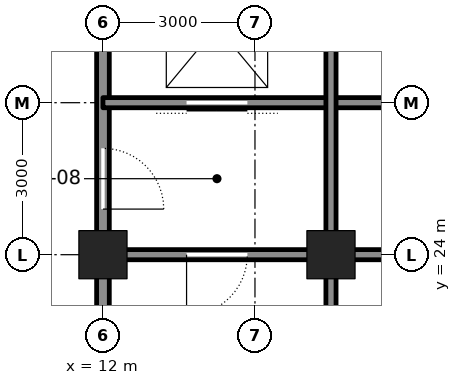
"""IFC4 building model, lengths in metres.
Left out: names, types, materials, properties, quantities, classifications, styles, units other than length and angle.
Written with IfcOpenShell. Run it as: python <this file> out.ifc"""

import sys

from ifc_helpers import new_model, si_unit, direction, frame, frame_2d, origin, origin_2d, place, context, subcontext, project, spatial, rectangle, hollow_rectangle, extrude, element, fill, save


model = new_model("IFC4")
c1 = context("Model", 3, precision=1e-05, world=origin(), true_north=direction((0.0, 1.0)))
c2 = subcontext(c1, "Body", "Model", "MODEL_VIEW")
j1 = project(units=[si_unit("LENGTHUNIT", "METRE"), si_unit("PLANEANGLEUNIT", "RADIAN")], contexts=[c1])
p1 = place(None, origin())
s1 = spatial("IfcSite", under=j1, at=p1, CompositionType="ELEMENT")
p2 = place(p1, origin())
s2 = spatial("IfcBuilding", under=s1, at=p2, CompositionType="ELEMENT")
p3 = place(p2, frame((0.0, 0.0, -5.0)))
s3 = spatial("IfcBuildingStorey", under=s2, at=p3, CompositionType="ELEMENT", Elevation=-5.0)
for number, where, z_axis, x_axis in (
    (1, (12.0, 24.0, -0.3), (0.0, 0.0, 1.0), (1.0, 0.0, 0.0)),
    (2, (16.5, 24.0, -0.3), (0.0, 0.0, 1.0), (1.0, 0.0, 0.0)),
):
    element("IfcColumn", number, at=place(p3, frame(where, z_axis=z_axis, x_axis=x_axis)), inside=s3, PredefinedType="COLUMN", context=c2, shape_type="SweptSolid", body=[
        extrude(hollow_rectangle(XDim=0.95, YDim=0.95, WallThickness=0.095, at=origin_2d()), origin(), (0.0, 0.0, 1.0), 5.3),
    ])
p4 = place(p3, frame((12.0, 21.25, 0.0), z_axis=(0.0, 0.0, 1.0), x_axis=(0.0, 1.0, 0.0)))
e3 = element("IfcWall", 3, at=p4, inside=s3, PredefinedType="SOLIDWALL", context=c2, shape_type="SweptSolid", body=[
    extrude(rectangle(XDim=2.5, YDim=0.25, at=frame_2d((1.25, 0.0))), origin(), (0.0, 0.0, 1.0), 3.873),
])
p5 = place(p3, frame((12.0, 24.25, 0.0), z_axis=(0.0, 0.0, 1.0), x_axis=(0.0, 1.0, 0.0)))
e4 = element("IfcWall", 4, at=p5, inside=s3, PredefinedType="SOLIDWALL", context=c2, shape_type="SweptSolid", body=[
    extrude(rectangle(XDim=8.5, YDim=0.25, at=frame_2d((4.25, 0.0))), origin(), (0.0, 0.0, 1.0), 3.873),
])
p6 = place(p5, frame((0.65, 0.0, 0.0)))
e5 = element("IfcOpeningElement", 5, at=p6, cuts=e4, PredefinedType="OPENING", context=c2, shape_type="SweptSolid", body=[
    extrude(rectangle(XDim=1.2, YDim=2.1, at=frame_2d((0.6, 1.05))), frame((0.0, 0.135, 0.0), z_axis=(0.0, -1.0, 0.0), x_axis=(1.0, 0.0, 0.0)), (0.0, 0.0, 1.0), 0.27),
])
p7 = place(p5, frame((6.875, 0.0, 0.0)))
e6 = element("IfcOpeningElement", 6, at=p7, cuts=e4, PredefinedType="OPENING", context=c2, shape_type="SweptSolid", body=[
    extrude(rectangle(XDim=0.75, YDim=2.1, at=frame_2d((0.375, 1.05))), frame((0.0, 0.135, 0.0), z_axis=(0.0, -1.0, 0.0), x_axis=(1.0, 0.0, 0.0)), (0.0, 0.0, 1.0), 0.27),
])
p8 = place(p3, frame((12.25, 24.0, 0.0), z_axis=(0.0, 0.0, 1.0), x_axis=(1.0, 0.0, 0.0)))
e7 = element("IfcWall", 7, at=p8, inside=s3, PredefinedType="SOLIDWALL", context=c2, shape_type="SweptSolid", body=[
    extrude(rectangle(XDim=4.0, YDim=0.2, at=frame_2d((2.0, 0.0))), origin(), (0.0, 0.0, 1.0), 3.85),
])
p9 = place(p8, frame((1.4, 0.0, 0.0)))
e8 = element("IfcOpeningElement", 8, at=p9, cuts=e7, PredefinedType="OPENING", context=c2, shape_type="SweptSolid", body=[
    extrude(rectangle(XDim=1.2, YDim=2.1, at=frame_2d((0.6, 1.05))), frame((0.0, 0.11, 0.0), z_axis=(0.0, -1.0, 0.0), x_axis=(1.0, 0.0, 0.0)), (0.0, 0.0, 1.0), 0.22),
])
p10 = place(p3, frame((16.75, 24.0, 0.0), z_axis=(0.0, 0.0, 1.0), x_axis=(1.0, 0.0, 0.0)))
e9 = element("IfcWall", 9, at=p10, inside=s3, PredefinedType="SOLIDWALL", context=c2, shape_type="SweptSolid", body=[
    extrude(rectangle(XDim=2.75, YDim=0.2, at=frame_2d((1.375, 0.0))), origin(), (0.0, 0.0, 1.0), 3.85),
])
p11 = place(p3, frame((12.0, 27.0, 0.0), z_axis=(0.0, 0.0, 1.0), x_axis=(1.0, 0.0, 0.0)))
e10 = element("IfcWall", 10, at=p11, inside=s3, PredefinedType="SOLIDWALL", context=c2, shape_type="SweptSolid", body=[
    extrude(rectangle(XDim=7.5, YDim=0.2, at=frame_2d((3.75, 0.0))), origin(), (0.0, 0.0, 1.0), 4.8),
])
p12 = place(p11, frame((1.65, 0.0, 0.0)))
e11 = element("IfcOpeningElement", 11, at=p12, cuts=e10, PredefinedType="OPENING", context=c2, shape_type="SweptSolid", body=[
    extrude(rectangle(XDim=1.2, YDim=2.1, at=frame_2d((0.6, 1.05))), frame((0.0, 0.11, 0.0), z_axis=(0.0, -1.0, 0.0), x_axis=(1.0, 0.0, 0.0)), (0.0, 0.0, 1.0), 0.22),
])
p13 = place(p3, frame((16.5, 21.25, 0.0), z_axis=(0.0, 0.0, 1.0), x_axis=(0.0, 1.0, 0.0)))
e12 = element("IfcWall", 12, at=p13, inside=s3, PredefinedType="SOLIDWALL", context=c2, shape_type="SweptSolid", body=[
    extrude(rectangle(XDim=2.5, YDim=0.2, at=frame_2d((1.25, 0.0))), origin(), (0.0, 0.0, 1.0), 3.873),
])
p14 = place(p3, frame((16.5, 24.25, 0.0), z_axis=(0.0, 0.0, 1.0), x_axis=(0.0, 1.0, 0.0)))
e13 = element("IfcWall", 13, at=p14, inside=s3, PredefinedType="SOLIDWALL", context=c2, shape_type="SweptSolid", body=[
    extrude(rectangle(XDim=8.5, YDim=0.2, at=frame_2d((4.25, 0.0))), origin(), (0.0, 0.0, 1.0), 3.873),
])
p15 = place(p9, frame((1.2, 0.0, 0.0), z_axis=(0.0, 0.0, 1.0), x_axis=(-1.0, 0.0, 0.0)))
e14 = element("IfcDoor", 14, at=p15, inside=s3, OperationType="SINGLE_SWING_RIGHT", PredefinedType="DOOR", context=c2, shape_type="SweptSolid", body=[
    extrude(rectangle(XDim=1.2, YDim=2.1, at=frame_2d((0.6, 1.05))), frame((0.0, 0.025, 0.0), z_axis=(0.0, -1.0, 0.0), x_axis=(1.0, 0.0, 0.0)), (0.0, 0.0, 1.0), 0.05),
])
fill(e8, e14)
p16 = place(p6, frame((1.2, 0.0, 0.0), z_axis=(0.0, 0.0, 1.0), x_axis=(-1.0, 0.0, 0.0)))
e15 = element("IfcDoor", 15, at=p16, inside=s3, OperationType="SINGLE_SWING_RIGHT", PredefinedType="DOOR", context=c2, shape_type="SweptSolid", body=[
    extrude(rectangle(XDim=1.2, YDim=2.1, at=frame_2d((0.6, 1.05))), frame((0.0, 0.025, 0.0), z_axis=(0.0, -1.0, 0.0), x_axis=(1.0, 0.0, 0.0)), (0.0, 0.0, 1.0), 0.05),
])
fill(e5, e15)
p17 = place(p12, origin())
e16 = element("IfcDoor", 16, at=p17, inside=s3, OperationType="DOUBLE_DOOR_SLIDING", PredefinedType="DOOR", context=c2, shape_type="SweptSolid", body=[
    extrude(rectangle(XDim=1.2, YDim=2.1, at=frame_2d((0.6, 1.05))), frame((0.0, 0.025, 0.0), z_axis=(0.0, -1.0, 0.0), x_axis=(1.0, 0.0, 0.0)), (0.0, 0.0, 1.0), 0.05),
])
fill(e11, e16)
save(model, sys.argv[1])
